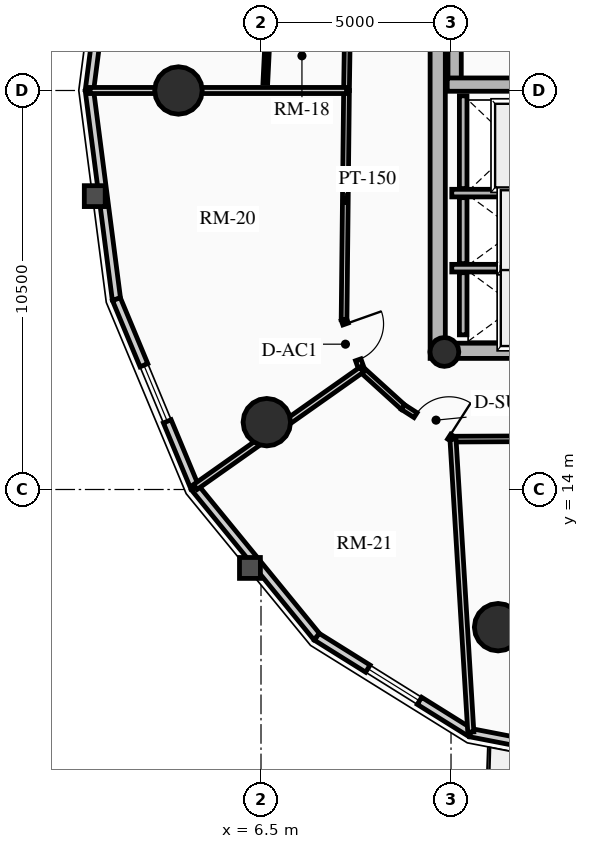
"""IFC4 building model, lengths in metres.
Left out: names, types, materials, properties, quantities, classifications, styles, units other than length and angle.
Written with IfcOpenShell. Run it as: python <this file> out.ifc"""

import sys

from ifc_helpers import new_model, si_unit, direction, frame, frame_2d, origin, origin_2d, place, context, subcontext, project, spatial, rectangle, circle, hollow_circle, extrude, source, transform, mapped, element, fill, save


model = new_model("IFC4")
c1 = context("Model", 3, precision=1e-05, world=origin(), true_north=direction((0.0, 1.0)))
c2 = subcontext(c1, "Body", "Model", "MODEL_VIEW")
j1 = project(units=[si_unit("LENGTHUNIT", "METRE"), si_unit("PLANEANGLEUNIT", "RADIAN")], contexts=[c1])
p1 = place(None, origin())
s1 = spatial("IfcSite", under=j1, at=p1, CompositionType="ELEMENT")
p2 = place(p1, origin())
s2 = spatial("IfcBuilding", under=s1, at=p2, CompositionType="ELEMENT")
p3 = place(p2, frame((0.0, 0.0, 154.51)))
s3 = spatial("IfcBuildingStorey", under=s2, at=p3, CompositionType="ELEMENT", Elevation=154.51)
p4 = place(p3, frame((11.15, 17.45, 0.0), z_axis=(0.0, 0.0, 1.0), x_axis=(0.0, 1.0, 0.0)))
e1 = element("IfcWall", 1, at=p4, inside=s3, PredefinedType="SHEAR", context=c2, shape_type="SweptSolid", body=[
    extrude(rectangle(XDim=14.1, YDim=0.4, at=frame_2d((7.05, 0.0))), origin(), (0.0, 0.0, 1.0), 2.91),
])
p5 = place(p3, frame((11.15, 17.65, 0.0), z_axis=(0.0, 0.0, 1.0), x_axis=(1.0, 0.0, 0.0)))
e2 = element("IfcWall", 2, at=p5, inside=s3, PredefinedType="SHEAR", context=c2, shape_type="SweptSolid", body=[
    extrude(rectangle(XDim=10.7, YDim=0.4, at=frame_2d((5.35, 0.0))), origin(), (0.0, 0.0, 1.0), 2.91),
])
m1 = source(origin(), c2, "Body", "SweptSolid", [
    extrude(rectangle(XDim=1.5, YDim=2.02, at=frame_2d((0.75, 1.01))), frame((0.0, 0.21, 0.0), z_axis=(0.0, -1.0, 0.0), x_axis=(1.0, 0.0, 0.0)), (0.0, 0.0, 1.0), 0.42),
])
p6 = place(p5, frame((5.45, 0.0, 0.0)))
e3 = element("IfcOpeningElement", 3, at=p6, cuts=e2, PredefinedType="OPENING", context=c2, shape_type="MappedRepresentation", body=[
    mapped(m1, transform((0.0, 0.0, 0.0), x_axis=(1.0, 0.0, 0.0), y_axis=(0.0, 1.0, 0.0), z_axis=(0.0, 0.0, 1.0), scale=1.0)),
])
p7 = place(p3, frame((11.595, 24.655, 0.0), z_axis=(0.0, 0.0, 1.0), x_axis=(0.0, 1.0, 0.0)))
e4 = element("IfcWall", 4, at=p7, inside=s3, PredefinedType="SHEAR", context=c2, shape_type="SweptSolid", body=[
    extrude(rectangle(XDim=6.695, YDim=0.35, at=frame_2d((3.348, 0.0))), origin(), (0.0, 0.0, 1.0), 2.91),
])
p8 = place(p3, frame((11.4, 24.655, 0.0), z_axis=(0.0, 0.0, 1.0), x_axis=(1.0, 0.0, 0.0)))
e5 = element("IfcWall", 5, at=p8, inside=s3, PredefinedType="SHEAR", context=c2, shape_type="SweptSolid", body=[
    extrude(rectangle(XDim=3.285, YDim=0.35, at=frame_2d((1.643, 0.0))), origin(), (0.0, 0.0, 1.0), 2.91),
])
p9 = place(p3, frame((11.325, 17.62, 0.0), z_axis=(0.0, 0.0, 1.0), x_axis=(1.0, 0.0, 0.0)))
e6 = element("IfcColumn", 6, at=p9, inside=s3, PredefinedType="COLUMN", context=c2, shape_type="SweptSolid", body=[
    extrude(hollow_circle(Radius=0.38, WallThickness=0.032, at=origin_2d()), origin(), (0.0, 0.0, 1.0), 2.91),
])
for number, where, z_axis, x_axis in (
    (7, (4.328, 24.5, 0.0), (0.0, 0.0, 1.0), (1.0, 0.0, 0.0)),
    (8, (6.653, 15.771, 0.0), (0.0, 0.0, 1.0), (1.0, 0.0, 0.0)),
    (9, (12.739, 10.377, 0.0), (0.0, 0.0, 1.0), (1.0, 0.0, 0.0)),
):
    element("IfcColumn", number, at=place(p3, frame(where, z_axis=z_axis, x_axis=x_axis)), inside=s3, PredefinedType="USERDEFINED", context=c2, shape_type="SweptSolid", body=[
        extrude(circle(Radius=0.625, at=origin_2d()), origin(), (0.0, 0.0, 1.0), 2.91),
    ])
p10 = place(p3, frame((1.985, 24.5, 0.0), z_axis=(0.0, 0.0, 1.0), x_axis=(0.128266533912, 0.991739732126, 0.0)))
e10 = element("IfcWall", 10, at=p10, inside=s3, PredefinedType="SOLIDWALL", context=c2, shape_type="SweptSolid", body=[
    extrude(rectangle(XDim=5.537, YDim=0.22, at=frame_2d((2.769, 0.0))), origin(), (0.0, 0.0, 1.0), 2.245),
])
m2 = source(origin(), c2, "Body", "SweptSolid", [
    extrude(rectangle(XDim=1.6, YDim=1.3, at=frame_2d((0.8, 0.65))), frame((0.0, 0.12, 0.0), z_axis=(0.0, -1.0, 0.0), x_axis=(1.0, 0.0, 0.0)), (0.0, 0.0, 1.0), 0.24),
])
p11 = place(p10, frame((1.968, 0.0, 0.65)))
e11 = element("IfcOpeningElement", 11, at=p11, cuts=e10, PredefinedType="OPENING", context=c2, shape_type="MappedRepresentation", body=[
    mapped(m2, transform((0.0, 0.0, 0.0), x_axis=(1.0, 0.0, 0.0), y_axis=(0.0, 1.0, 0.0), z_axis=(0.0, 0.0, 1.0), scale=1.0)),
])
p12 = place(p3, frame((2.695, 19.009, 0.0), z_axis=(0.0, 0.0, 1.0), x_axis=(-0.128266533912, 0.991739732126, 0.0)))
e12 = element("IfcWall", 12, at=p12, inside=s3, PredefinedType="SOLIDWALL", context=c2, shape_type="SweptSolid", body=[
    extrude(rectangle(XDim=5.537, YDim=0.22, at=frame_2d((2.769, 0.0))), origin(), (0.0, 0.0, 1.0), 2.245),
])
p13 = place(p3, frame((4.757, 14.055, 0.0), z_axis=(0.0, 0.0, 1.0), x_axis=(-0.384259959969, 0.923224936386, 0.0)))
e13 = element("IfcWall", 13, at=p13, inside=s3, PredefinedType="SOLIDWALL", context=c2, shape_type="SweptSolid", body=[
    extrude(rectangle(XDim=5.365, YDim=0.22, at=frame_2d((2.683, 0.0))), origin(), (0.0, 0.0, 1.0), 2.245),
])
p14 = place(p13, frame((1.883, 0.0, 0.65)))
e14 = element("IfcOpeningElement", 14, at=p14, cuts=e13, PredefinedType="OPENING", context=c2, shape_type="MappedRepresentation", body=[
    mapped(m2, transform((0.0, 0.0, 0.0), x_axis=(1.0, 0.0, 0.0), y_axis=(0.0, 1.0, 0.0), z_axis=(0.0, 0.0, 1.0), scale=1.0)),
])
p15 = place(p3, frame((7.968, 10.124, 0.0), z_axis=(0.0, 0.0, 1.0), x_axis=(-0.632598524901, 0.774479894053, 0.0)))
e15 = element("IfcWall", 15, at=p15, inside=s3, PredefinedType="SOLIDWALL", context=c2, shape_type="SweptSolid", body=[
    extrude(rectangle(XDim=5.076, YDim=0.22, at=frame_2d((2.538, 0.0))), origin(), (0.0, 0.0, 1.0), 2.245),
])
p16 = place(p3, frame((12.015, 7.6, 0.0), z_axis=(0.0, 0.0, 1.0), x_axis=(-0.848452391194, 0.529271707044, 0.0)))
e16 = element("IfcWall", 16, at=p16, inside=s3, PredefinedType="SOLIDWALL", context=c2, shape_type="SweptSolid", body=[
    extrude(rectangle(XDim=4.769, YDim=0.22, at=frame_2d((2.385, 0.0))), origin(), (0.0, 0.0, 1.0), 2.245),
])
p17 = place(p16, frame((1.585, 0.0, 0.65)))
e17 = element("IfcOpeningElement", 17, at=p17, cuts=e16, PredefinedType="OPENING", context=c2, shape_type="MappedRepresentation", body=[
    mapped(m2, transform((0.0, 0.0, 0.0), x_axis=(1.0, 0.0, 0.0), y_axis=(0.0, 1.0, 0.0), z_axis=(0.0, 0.0, 1.0), scale=1.0)),
])
p18 = place(p3, frame((16.5, 6.73, 0.0), z_axis=(0.0, 0.0, 1.0), x_axis=(-0.981718699963, 0.190337579429, 0.0)))
e18 = element("IfcWall", 18, at=p18, inside=s3, PredefinedType="SOLIDWALL", context=c2, shape_type="SweptSolid", body=[
    extrude(rectangle(XDim=4.569, YDim=0.22, at=frame_2d((2.284, 0.0))), origin(), (0.0, 0.0, 1.0), 2.245),
])
m3 = source(origin(), c2, "Body", "SweptSolid", [
    extrude(rectangle(XDim=1.15, YDim=2.005, at=frame_2d((0.575, 1.002))), frame((0.0, 0.12, 0.0), z_axis=(0.0, -1.0, 0.0), x_axis=(1.0, 0.0, 0.0)), (0.0, 0.0, 1.0), 0.24),
])
p19 = place(p18, frame((1.709, 0.0, 0.0)))
e19 = element("IfcOpeningElement", 19, at=p19, cuts=e18, PredefinedType="OPENING", context=c2, shape_type="MappedRepresentation", body=[
    mapped(m3, transform((0.0, 0.0, 0.0), x_axis=(1.0, 0.0, 0.0), y_axis=(0.0, 1.0, 0.0), z_axis=(0.0, 0.0, 1.0), scale=1.0)),
])
p20 = place(p3, frame((11.52, 21.8, 0.0), z_axis=(0.0, 0.0, 1.0), x_axis=(1.0, 0.0, 0.0)))
e20 = element("IfcWall", 20, at=p20, inside=s3, PredefinedType="SHEAR", context=c2, shape_type="SweptSolid", body=[
    extrude(rectangle(XDim=2.97, YDim=0.2, at=frame_2d((1.485, 0.0))), origin(), (0.0, 0.0, 1.0), 2.91),
])
p21 = place(p3, frame((11.82, 21.92, 0.0), z_axis=(0.0, 0.0, 1.0), x_axis=(0.0, 1.0, 0.0)))
e21 = element("IfcWall", 21, at=p21, inside=s3, PredefinedType="SHEAR", context=c2, shape_type="SweptSolid", body=[
    extrude(rectangle(XDim=2.44, YDim=0.2, at=frame_2d((1.22, 0.0))), origin(), (0.0, 0.0, 1.0), 2.91),
])
p22 = place(p3, frame((11.52, 19.825, 0.0), z_axis=(0.0, 0.0, 1.0), x_axis=(1.0, 0.0, 0.0)))
e22 = element("IfcWall", 22, at=p22, inside=s3, PredefinedType="SHEAR", context=c2, shape_type="SweptSolid", body=[
    extrude(rectangle(XDim=2.97, YDim=0.2, at=frame_2d((1.485, 0.0))), origin(), (0.0, 0.0, 1.0), 2.91),
])
p23 = place(p3, frame((11.82, 19.945, 0.0), z_axis=(0.0, 0.0, 1.0), x_axis=(0.0, 1.0, 0.0)))
e23 = element("IfcWall", 23, at=p23, inside=s3, PredefinedType="SHEAR", context=c2, shape_type="SweptSolid", body=[
    extrude(rectangle(XDim=1.735, YDim=0.2, at=frame_2d((0.867, 0.0))), origin(), (0.0, 0.0, 1.0), 2.91),
])
p24 = place(p3, frame((11.82, 18.07, 0.0), z_axis=(0.0, 0.0, 1.0), x_axis=(0.0, 1.0, 0.0)))
e24 = element("IfcWall", 24, at=p24, inside=s3, PredefinedType="SHEAR", context=c2, shape_type="SweptSolid", body=[
    extrude(rectangle(XDim=1.635, YDim=0.2, at=frame_2d((0.817, 0.0))), origin(), (0.0, 0.0, 1.0), 2.91),
])
p25 = place(p3, frame((8.84, 30.414, 0.0), z_axis=(0.0, 0.0, 1.0), x_axis=(-0.01514915101, -0.999885245027, 0.0)))
e25 = element("IfcWall", 25, at=p25, inside=s3, PredefinedType="PARTITIONING", context=c2, shape_type="SweptSolid", body=[
    extrude(rectangle(XDim=5.915, YDim=0.15, at=frame_2d((2.957, 0.0))), origin(), (0.0, 0.0, 1.0), 2.675),
])
p26 = place(p3, frame((8.75, 24.5, 0.0), z_axis=(0.0, 0.0, 1.0), x_axis=(-0.01076642715, -0.999942040344, 0.0)))
e26 = element("IfcWall", 26, at=p26, inside=s3, PredefinedType="PARTITIONING", context=c2, shape_type="SweptSolid", body=[
    extrude(rectangle(XDim=6.032, YDim=0.15, at=frame_2d((3.016, 0.0))), origin(), (0.0, 0.0, 1.0), 2.245),
])
p27 = place(p3, frame((8.685, 18.469, 0.0), z_axis=(0.0, 0.0, 1.0), x_axis=(0.333415749461, -0.942779899028, 0.0)))
e27 = element("IfcWall", 27, at=p27, inside=s3, PredefinedType="PARTITIONING", context=c2, shape_type="SweptSolid", body=[
    extrude(rectangle(XDim=1.394, YDim=0.15, at=frame_2d((0.697, 0.0))), origin(), (0.0, 0.0, 1.0), 2.245),
])
m4 = source(origin(), c2, "Body", "SweptSolid", [
    extrude(rectangle(XDim=1.0, YDim=2.015, at=frame_2d((0.5, 1.007))), frame((0.0, 0.085, 0.0), z_axis=(0.0, -1.0, 0.0), x_axis=(1.0, 0.0, 0.0)), (0.0, 0.0, 1.0), 0.17),
])
p28 = place(p27, frame((0.12, 0.0, 0.0)))
e28 = element("IfcOpeningElement", 28, at=p28, cuts=e27, PredefinedType="OPENING", context=c2, shape_type="MappedRepresentation", body=[
    mapped(m4, transform((0.0, 0.0, 0.0), x_axis=(1.0, 0.0, 0.0), y_axis=(0.0, 1.0, 0.0), z_axis=(0.0, 0.0, 1.0), scale=1.0)),
])
p29 = place(p3, frame((9.15, 17.155, 0.0), z_axis=(0.0, 0.0, 1.0), x_axis=(0.740451494731, -0.672109800517, 0.0)))
e29 = element("IfcWall", 29, at=p29, inside=s3, PredefinedType="PARTITIONING", context=c2, shape_type="SweptSolid", body=[
    extrude(rectangle(XDim=1.468, YDim=0.15, at=frame_2d((0.734, 0.0))), origin(), (0.0, 0.0, 1.0), 2.245),
])
p30 = place(p3, frame((10.237, 16.168, 0.0), z_axis=(0.0, 0.0, 1.0), x_axis=(0.842061223587, -0.53938195718, 0.0)))
e30 = element("IfcWall", 30, at=p30, inside=s3, PredefinedType="PARTITIONING", context=c2, shape_type="SweptSolid", body=[
    extrude(rectangle(XDim=1.562, YDim=0.15, at=frame_2d((0.781, 0.0))), origin(), (0.0, 0.0, 1.0), 2.245),
])
m5 = source(origin(), c2, "Body", "SweptSolid", [
    extrude(rectangle(XDim=1.05, YDim=2.015, at=frame_2d((0.525, 1.007))), frame((0.0, 0.085, 0.0), z_axis=(0.0, -1.0, 0.0), x_axis=(1.0, 0.0, 0.0)), (0.0, 0.0, 1.0), 0.17),
])
p31 = place(p30, frame((0.392, 0.0, 0.0)))
e31 = element("IfcOpeningElement", 31, at=p31, cuts=e30, PredefinedType="OPENING", context=c2, shape_type="MappedRepresentation", body=[
    mapped(m5, transform((0.0, 0.0, 0.0), x_axis=(1.0, 0.0, 0.0), y_axis=(0.0, 1.0, 0.0), z_axis=(0.0, 0.0, 1.0), scale=1.0)),
])
p32 = place(p3, frame((11.552, 15.326, 0.0), z_axis=(0.0, 0.0, 1.0), x_axis=(0.999989573465, 0.004566504266, 0.0)))
e32 = element("IfcWall", 32, at=p32, inside=s3, PredefinedType="PARTITIONING", context=c2, shape_type="SweptSolid", body=[
    extrude(rectangle(XDim=3.261, YDim=0.15, at=frame_2d((1.631, 0.0))), origin(), (0.0, 0.0, 1.0), 2.245),
])
p33 = place(p3, frame((8.75, 24.5, 0.0), z_axis=(0.0, 0.0, 1.0), x_axis=(-1.0, 0.0, 0.0)))
e33 = element("IfcWall", 33, at=p33, inside=s3, PredefinedType="PARTITIONING", context=c2, shape_type="SweptSolid", body=[
    extrude(rectangle(XDim=6.745, YDim=0.16, at=frame_2d((3.373, 0.0))), origin(), (0.0, 0.0, 1.0), 2.245),
])
p34 = place(p3, frame((9.15, 17.155, 0.0), z_axis=(0.0, 0.0, 1.0), x_axis=(-0.81708911443, -0.576511386774, 0.0)))
e34 = element("IfcWall", 34, at=p34, inside=s3, PredefinedType="PARTITIONING", context=c2, shape_type="SweptSolid", body=[
    extrude(rectangle(XDim=5.356, YDim=0.16, at=frame_2d((2.678, 0.0))), origin(), (0.0, 0.0, 1.0), 2.245),
])
p35 = place(p3, frame((11.552, 15.326, 0.0), z_axis=(0.0, 0.0, 1.0), x_axis=(0.060740403573, -0.998153597085, 0.0)))
e35 = element("IfcWall", 35, at=p35, inside=s3, PredefinedType="PARTITIONING", context=c2, shape_type="SweptSolid", body=[
    extrude(rectangle(XDim=7.721, YDim=0.16, at=frame_2d((3.861, 0.0))), origin(), (0.0, 0.0, 1.0), 2.245),
])
p36 = place(p3, frame((6.751, 27.475, 0.0), z_axis=(0.0, 0.0, 1.0), x_axis=(-0.049591166042, -0.998769601185, 0.0)))
e36 = element("IfcWall", 36, at=p36, inside=s3, PredefinedType="PARTITIONING", context=c2, shape_type="SweptSolid", body=[
    extrude(rectangle(XDim=2.777, YDim=0.125, at=frame_2d((1.388, 0.0))), origin(), (0.0, 0.0, 1.0), 2.675),
])
m6 = source(origin(), c2, "Body", "SweptSolid", [
    extrude(rectangle(XDim=0.9, YDim=2.005, at=frame_2d((0.45, 1.002))), frame((0.0, 0.073, 0.0), z_axis=(0.0, -1.0, 0.0), x_axis=(1.0, 0.0, 0.0)), (0.0, 0.0, 1.0), 0.145),
])
p37 = place(p36, frame((0.12, 0.0, 0.0)))
e37 = element("IfcOpeningElement", 37, at=p37, cuts=e36, PredefinedType="OPENING", context=c2, shape_type="MappedRepresentation", body=[
    mapped(m6, transform((0.0, 0.0, 0.0), x_axis=(1.0, 0.0, 0.0), y_axis=(0.0, 1.0, 0.0), z_axis=(0.0, 0.0, 1.0), scale=1.0)),
])
m7 = source(origin(), c2, "Body", "SweptSolid", [
    extrude(rectangle(XDim=1.6, YDim=1.3, at=frame_2d((0.8, 0.65))), frame((0.0, 0.03, 0.0), z_axis=(0.0, -1.0, 0.0), x_axis=(1.0, 0.0, 0.0)), (0.0, 0.0, 1.0), 0.06),
])
p38 = place(p14, origin())
e38 = element("IfcWindow", 38, at=p38, inside=s3, PartitioningType="SINGLE_PANEL", PredefinedType="WINDOW", context=c2, shape_type="MappedRepresentation", body=[
    mapped(m7, transform((0.0, 0.0, 0.0), x_axis=(1.0, 0.0, 0.0), y_axis=(0.0, 1.0, 0.0), z_axis=(0.0, 0.0, 1.0), scale=1.0)),
])
fill(e14, e38)
p39 = place(p17, origin())
e39 = element("IfcWindow", 39, at=p39, inside=s3, PartitioningType="SINGLE_PANEL", PredefinedType="WINDOW", context=c2, shape_type="MappedRepresentation", body=[
    mapped(m7, transform((0.0, 0.0, 0.0), x_axis=(1.0, 0.0, 0.0), y_axis=(0.0, 1.0, 0.0), z_axis=(0.0, 0.0, 1.0), scale=1.0)),
])
fill(e17, e39)
m8 = source(origin(), c2, "Body", "SweptSolid", [
    extrude(rectangle(XDim=1.0, YDim=2.015, at=frame_2d((0.5, 1.007))), frame((0.0, 0.025, 0.0), z_axis=(0.0, -1.0, 0.0), x_axis=(1.0, 0.0, 0.0)), (0.0, 0.0, 1.0), 0.05),
])
p40 = place(p28, origin())
e40 = element("IfcDoor", 40, at=p40, inside=s3, OperationType="SINGLE_SWING_LEFT", PredefinedType="DOOR", context=c2, shape_type="MappedRepresentation", body=[
    mapped(m8, transform((0.0, 0.0, 0.0), x_axis=(1.0, 0.0, 0.0), y_axis=(0.0, 1.0, 0.0), z_axis=(0.0, 0.0, 1.0), scale=1.0)),
])
fill(e28, e40)
m9 = source(origin(), c2, "Body", "SweptSolid", [
    extrude(rectangle(XDim=1.05, YDim=2.015, at=frame_2d((0.525, 1.007))), frame((0.0, 0.025, 0.0), z_axis=(0.0, -1.0, 0.0), x_axis=(1.0, 0.0, 0.0)), (0.0, 0.0, 1.0), 0.05),
])
p41 = place(p31, origin())
e41 = element("IfcDoor", 41, at=p41, inside=s3, OperationType="SINGLE_SWING_RIGHT", PredefinedType="DOOR", context=c2, shape_type="MappedRepresentation", body=[
    mapped(m9, transform((0.0, 0.0, 0.0), x_axis=(1.0, 0.0, 0.0), y_axis=(0.0, 1.0, 0.0), z_axis=(0.0, 0.0, 1.0), scale=1.0)),
])
fill(e31, e41)
save(model, sys.argv[1])
